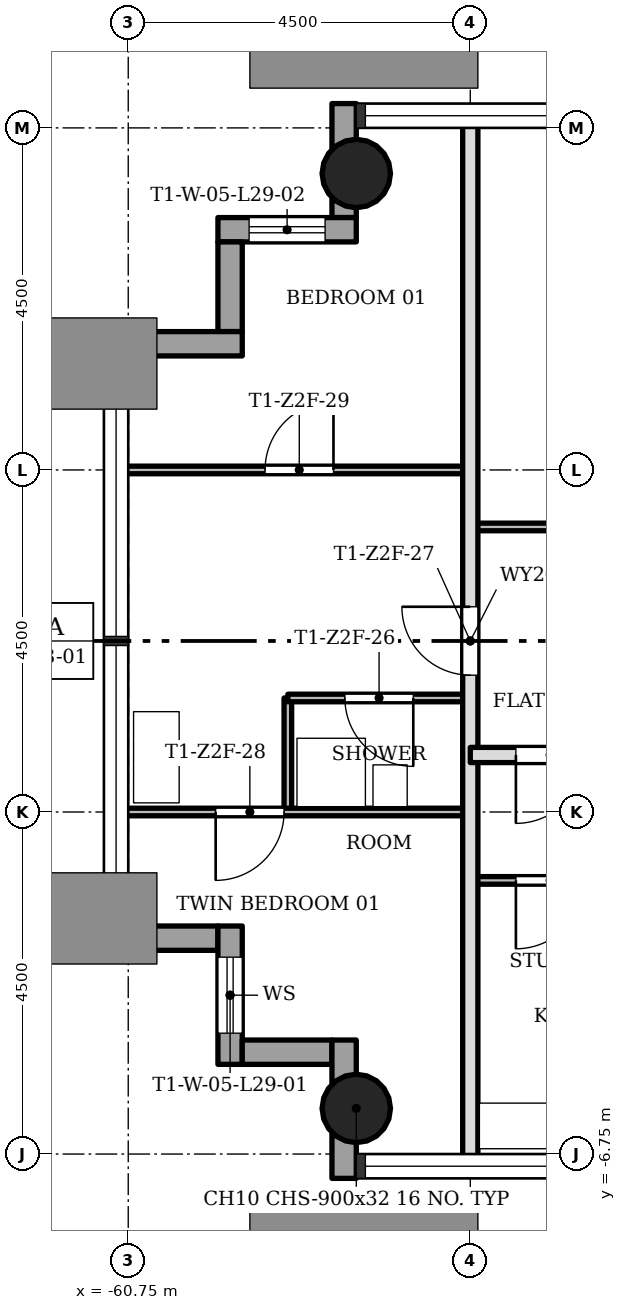
"""IFC4 building model, lengths in metres.
Left out: names, types, materials, properties, quantities, classifications, styles, units other than length and angle.
Written with IfcOpenShell. Run it as: python <this file> out.ifc"""

import sys

from ifc_helpers import new_model, si_unit, direction, frame, frame_2d, origin, origin_2d, place, context, subcontext, project, spatial, rectangle, hollow_circle, extrude, element, fill, save


model = new_model("IFC4")
c1 = context("Model", 3, precision=1e-05, world=origin(), true_north=direction((0.0, 1.0)))
c2 = subcontext(c1, "Body", "Model", "MODEL_VIEW")
j1 = project(units=[si_unit("LENGTHUNIT", "METRE"), si_unit("PLANEANGLEUNIT", "RADIAN")], contexts=[c1])
p1 = place(None, origin())
s1 = spatial("IfcSite", under=j1, at=p1, CompositionType="ELEMENT")
p2 = place(p1, origin())
s2 = spatial("IfcBuilding", under=s1, at=p2, CompositionType="ELEMENT")
p3 = place(p2, frame((0.0, 0.0, 107.2)))
s3 = spatial("IfcBuildingStorey", under=s2, at=p3, CompositionType="ELEMENT", Elevation=107.2)
for number, where, z_axis, x_axis in (
    (1, (-57.75, -6.15, 0.0), (0.0, 0.0, 1.0), (1.0, 0.0, 0.0)),
    (2, (-57.75, 6.15, 0.0), (0.0, 0.0, 1.0), (1.0, 0.0, 0.0)),
):
    element("IfcColumn", number, at=place(p3, frame(where, z_axis=z_axis, x_axis=x_axis)), inside=s3, PredefinedType="COLUMN", context=c2, shape_type="SweptSolid", body=[
        extrude(hollow_circle(Radius=0.45, WallThickness=0.032, at=origin_2d()), origin(), (0.0, 0.0, 1.0), 3.4),
    ])
p4 = place(p3, frame((-61.07, -3.91, -0.3), z_axis=(0.0, 0.0, 1.0), x_axis=(1.0, 0.0, 0.0)))
e3 = element("IfcWall", 3, at=p4, inside=s3, PredefinedType="STANDARD", context=c2, shape_type="SweptSolid", body=[
    extrude(rectangle(XDim=1.5, YDim=0.32, at=frame_2d((0.75, 0.0))), origin(), (0.0, 0.0, 1.0), 3.4),
])
p5 = place(p3, frame((-59.41, -3.75, -0.3), z_axis=(0.0, 0.0, 1.0), x_axis=(0.0, -1.0, 0.0)))
e4 = element("IfcWall", 4, at=p5, inside=s3, PredefinedType="STANDARD", context=c2, shape_type="SweptSolid", body=[
    extrude(rectangle(XDim=1.82, YDim=0.32, at=frame_2d((0.91, 0.0))), origin(), (0.0, 0.0, 1.0), 3.4),
])
p6 = place(p5, frame((0.41, 0.0, 1.2)))
e5 = element("IfcOpeningElement", 5, at=p6, cuts=e4, PredefinedType="OPENING", context=c2, shape_type="SweptSolid", body=[
    extrude(rectangle(XDim=1.0, YDim=1.5, at=frame_2d((0.5, 0.75))), frame((0.0, 0.17, 0.0), z_axis=(0.0, -1.0, 0.0), x_axis=(1.0, 0.0, 0.0)), (0.0, 0.0, 1.0), 0.34),
])
p7 = place(p3, frame((-59.25, -5.41, -0.3), z_axis=(0.0, 0.0, 1.0), x_axis=(1.0, 0.0, 0.0)))
e6 = element("IfcWall", 6, at=p7, inside=s3, PredefinedType="STANDARD", context=c2, shape_type="SweptSolid", body=[
    extrude(rectangle(XDim=1.18, YDim=0.32, at=frame_2d((0.59, 0.0))), origin(), (0.0, 0.0, 1.0), 3.4),
])
p8 = place(p3, frame((-57.91, -5.25, -0.3), z_axis=(0.0, 0.0, 1.0), x_axis=(0.0, -1.0, 0.0)))
e7 = element("IfcWall", 7, at=p8, inside=s3, PredefinedType="STANDARD", context=c2, shape_type="SweptSolid", body=[
    extrude(rectangle(XDim=1.82, YDim=0.32, at=frame_2d((0.91, 0.0))), origin(), (0.0, 0.0, 1.0), 3.4),
])
p9 = place(p3, frame((-57.91, 7.07, -0.3), z_axis=(0.0, 0.0, 1.0), x_axis=(0.0, -1.0, 0.0)))
e8 = element("IfcWall", 8, at=p9, inside=s3, PredefinedType="STANDARD", context=c2, shape_type="SweptSolid", body=[
    extrude(rectangle(XDim=1.5, YDim=0.32, at=frame_2d((0.75, 0.0))), origin(), (0.0, 0.0, 1.0), 3.4),
])
p10 = place(p3, frame((-57.75, 5.41, -0.3), z_axis=(0.0, 0.0, 1.0), x_axis=(-1.0, 0.0, 0.0)))
e9 = element("IfcWall", 9, at=p10, inside=s3, PredefinedType="STANDARD", context=c2, shape_type="SweptSolid", body=[
    extrude(rectangle(XDim=1.82, YDim=0.32, at=frame_2d((0.91, 0.0))), origin(), (0.0, 0.0, 1.0), 3.4),
])
p11 = place(p10, frame((0.41, 0.0, 1.2)))
e10 = element("IfcOpeningElement", 10, at=p11, cuts=e9, PredefinedType="OPENING", context=c2, shape_type="SweptSolid", body=[
    extrude(rectangle(XDim=1.0, YDim=1.5, at=frame_2d((0.5, 0.75))), frame((0.0, 0.17, 0.0), z_axis=(0.0, -1.0, 0.0), x_axis=(1.0, 0.0, 0.0)), (0.0, 0.0, 1.0), 0.34),
])
p12 = place(p3, frame((-59.41, 5.25, -0.3), z_axis=(0.0, 0.0, 1.0), x_axis=(0.0, -1.0, 0.0)))
e11 = element("IfcWall", 11, at=p12, inside=s3, PredefinedType="STANDARD", context=c2, shape_type="SweptSolid", body=[
    extrude(rectangle(XDim=1.18, YDim=0.32, at=frame_2d((0.59, 0.0))), origin(), (0.0, 0.0, 1.0), 3.4),
])
p13 = place(p3, frame((-59.25, 3.91, -0.3), z_axis=(0.0, 0.0, 1.0), x_axis=(-1.0, 0.0, 0.0)))
e12 = element("IfcWall", 12, at=p13, inside=s3, PredefinedType="STANDARD", context=c2, shape_type="SweptSolid", body=[
    extrude(rectangle(XDim=1.82, YDim=0.32, at=frame_2d((0.91, 0.0))), origin(), (0.0, 0.0, 1.0), 3.4),
])
p14 = place(p3, frame((-58.65, -2.25, 0.0), z_axis=(0.0, 0.0, 1.0), x_axis=(0.0, 1.0, 0.0)))
e13 = element("IfcWall", 13, at=p14, inside=s3, PredefinedType="PARTITIONING", context=c2, shape_type="SweptSolid", body=[
    extrude(rectangle(XDim=1.5, YDim=0.1, at=frame_2d((0.75, 0.0))), origin(), (0.0, 0.0, 1.0), 3.0),
])
p15 = place(p3, frame((-56.25, -6.85, 0.0), z_axis=(0.0, 0.0, 1.0), x_axis=(0.0, 1.0, 0.0)))
e14 = element("IfcWall", 14, at=p15, inside=s3, PredefinedType="SOLIDWALL", context=c2, shape_type="SweptSolid", body=[
    extrude(rectangle(XDim=13.7, YDim=0.2, at=frame_2d((6.85, 0.0))), origin(), (0.0, 0.0, 1.0), 3.0),
])
p16 = place(p15, frame((6.4, 0.0, 0.0)))
e15 = element("IfcOpeningElement", 15, at=p16, cuts=e14, PredefinedType="OPENING", context=c2, shape_type="SweptSolid", body=[
    extrude(rectangle(XDim=0.9, YDim=2.1, at=frame_2d((0.45, 1.05))), frame((0.0, 0.11, 0.0), z_axis=(0.0, -1.0, 0.0), x_axis=(1.0, 0.0, 0.0)), (0.0, 0.0, 1.0), 0.22),
])
p17 = place(p3, frame((-56.25, -3.15, 0.0), z_axis=(0.0, 0.0, 1.0), x_axis=(1.0, 0.0, 0.0)))
e16 = element("IfcWall", 16, at=p17, inside=s3, PredefinedType="PARTITIONING", context=c2, shape_type="SweptSolid", body=[
    extrude(rectangle(XDim=4.5, YDim=0.1, at=frame_2d((2.25, 0.0))), origin(), (0.0, 0.0, 1.0), 3.0),
])
p18 = place(p17, frame((0.6, 0.0, 0.0)))
e17 = element("IfcOpeningElement", 17, at=p18, cuts=e16, PredefinedType="OPENING", context=c2, shape_type="SweptSolid", body=[
    extrude(rectangle(XDim=0.9, YDim=2.1, at=frame_2d((0.45, 1.05))), frame((0.0, 0.06, 0.0), z_axis=(0.0, -1.0, 0.0), x_axis=(1.0, 0.0, 0.0)), (0.0, 0.0, 1.0), 0.12),
])
p19 = place(p3, frame((-60.85, -2.25, 0.0), z_axis=(0.0, 0.0, 1.0), x_axis=(1.0, 0.0, 0.0)))
e18 = element("IfcWall", 18, at=p19, inside=s3, PredefinedType="PARTITIONING", context=c2, shape_type="SweptSolid", body=[
    extrude(rectangle(XDim=4.6, YDim=0.1, at=frame_2d((2.3, 0.0))), origin(), (0.0, 0.0, 1.0), 3.0),
])
p20 = place(p19, frame((1.25, 0.0, 0.0)))
e19 = element("IfcOpeningElement", 19, at=p20, cuts=e18, PredefinedType="OPENING", context=c2, shape_type="SweptSolid", body=[
    extrude(rectangle(XDim=0.9, YDim=2.1, at=frame_2d((0.45, 1.05))), frame((0.0, 0.06, 0.0), z_axis=(0.0, -1.0, 0.0), x_axis=(1.0, 0.0, 0.0)), (0.0, 0.0, 1.0), 0.12),
])
p21 = place(p3, frame((-56.25, -1.5, 0.0), z_axis=(0.0, 0.0, 1.0), x_axis=(1.0, 0.0, 0.0)))
e20 = element("IfcWall", 20, at=p21, inside=s3, PredefinedType="SOLIDWALL", context=c2, shape_type="SweptSolid", body=[
    extrude(rectangle(XDim=4.5, YDim=0.2, at=frame_2d((2.25, 0.0))), origin(), (0.0, 0.0, 1.0), 3.0),
])
p22 = place(p21, frame((0.6, 0.0, 0.0)))
e21 = element("IfcOpeningElement", 21, at=p22, cuts=e20, PredefinedType="OPENING", context=c2, shape_type="SweptSolid", body=[
    extrude(rectangle(XDim=0.9, YDim=2.1, at=frame_2d((0.45, 1.05))), frame((0.0, 0.11, 0.0), z_axis=(0.0, -1.0, 0.0), x_axis=(1.0, 0.0, 0.0)), (0.0, 0.0, 1.0), 0.22),
])
p23 = place(p3, frame((-58.65, -0.75, 0.0), z_axis=(0.0, 0.0, 1.0), x_axis=(1.0, 0.0, 0.0)))
e22 = element("IfcWall", 22, at=p23, inside=s3, PredefinedType="PARTITIONING", context=c2, shape_type="SweptSolid", body=[
    extrude(rectangle(XDim=2.4, YDim=0.1, at=frame_2d((1.2, 0.0))), origin(), (0.0, 0.0, 1.0), 3.0),
])
p24 = place(p23, frame((0.75, 0.0, 0.0)))
e23 = element("IfcOpeningElement", 23, at=p24, cuts=e22, PredefinedType="OPENING", context=c2, shape_type="SweptSolid", body=[
    extrude(rectangle(XDim=0.9, YDim=2.1, at=frame_2d((0.45, 1.05))), frame((0.0, 0.06, 0.0), z_axis=(0.0, -1.0, 0.0), x_axis=(1.0, 0.0, 0.0)), (0.0, 0.0, 1.0), 0.12),
])
p25 = place(p3, frame((-56.25, 1.5, 0.0), z_axis=(0.0, 0.0, 1.0), x_axis=(1.0, 0.0, 0.0)))
e24 = element("IfcWall", 24, at=p25, inside=s3, PredefinedType="PARTITIONING", context=c2, shape_type="SweptSolid", body=[
    extrude(rectangle(XDim=4.5, YDim=0.1, at=frame_2d((2.25, 0.0))), origin(), (0.0, 0.0, 1.0), 3.0),
])
p26 = place(p25, frame((1.8, 0.0, 0.0)))
e25 = element("IfcOpeningElement", 25, at=p26, cuts=e24, PredefinedType="OPENING", context=c2, shape_type="SweptSolid", body=[
    extrude(rectangle(XDim=0.9, YDim=2.1, at=frame_2d((0.45, 1.05))), frame((0.0, 0.06, 0.0), z_axis=(0.0, -1.0, 0.0), x_axis=(1.0, 0.0, 0.0)), (0.0, 0.0, 1.0), 0.12),
])
p27 = place(p3, frame((-60.85, 2.25, 0.0), z_axis=(0.0, 0.0, 1.0), x_axis=(1.0, 0.0, 0.0)))
e26 = element("IfcWall", 26, at=p27, inside=s3, PredefinedType="PARTITIONING", context=c2, shape_type="SweptSolid", body=[
    extrude(rectangle(XDim=4.6, YDim=0.1, at=frame_2d((2.3, 0.0))), origin(), (0.0, 0.0, 1.0), 3.0),
])
p28 = place(p27, frame((1.9, 0.0, 0.0)))
e27 = element("IfcOpeningElement", 27, at=p28, cuts=e26, PredefinedType="OPENING", context=c2, shape_type="SweptSolid", body=[
    extrude(rectangle(XDim=0.9, YDim=2.1, at=frame_2d((0.45, 1.05))), frame((0.0, 0.06, 0.0), z_axis=(0.0, -1.0, 0.0), x_axis=(1.0, 0.0, 0.0)), (0.0, 0.0, 1.0), 0.12),
])
p29 = place(p22, origin())
e28 = element("IfcDoor", 28, at=p29, inside=s3, OperationType="SINGLE_SWING_LEFT", PredefinedType="DOOR", context=c2, shape_type="SweptSolid", body=[
    extrude(rectangle(XDim=0.9, YDim=2.1, at=frame_2d((0.45, 1.05))), frame((0.0, 0.025, 0.0), z_axis=(0.0, -1.0, 0.0), x_axis=(1.0, 0.0, 0.0)), (0.0, 0.0, 1.0), 0.05),
])
fill(e21, e28)
p30 = place(p18, origin())
e29 = element("IfcDoor", 29, at=p30, inside=s3, OperationType="SINGLE_SWING_LEFT", PredefinedType="DOOR", context=c2, shape_type="SweptSolid", body=[
    extrude(rectangle(XDim=0.9, YDim=2.1, at=frame_2d((0.45, 1.05))), frame((0.0, 0.025, 0.0), z_axis=(0.0, -1.0, 0.0), x_axis=(1.0, 0.0, 0.0)), (0.0, 0.0, 1.0), 0.05),
])
fill(e17, e29)
p31 = place(p24, origin())
e30 = element("IfcDoor", 30, at=p31, inside=s3, OperationType="SINGLE_SWING_RIGHT", PredefinedType="DOOR", context=c2, shape_type="SweptSolid", body=[
    extrude(rectangle(XDim=0.9, YDim=2.1, at=frame_2d((0.45, 1.05))), frame((0.0, 0.025, 0.0), z_axis=(0.0, -1.0, 0.0), x_axis=(1.0, 0.0, 0.0)), (0.0, 0.0, 1.0), 0.05),
])
fill(e23, e30)
p32 = place(p16, origin())
e31 = element("IfcDoor", 31, at=p32, inside=s3, OperationType="SINGLE_SWING_LEFT", PredefinedType="DOOR", context=c2, shape_type="SweptSolid", body=[
    extrude(rectangle(XDim=0.9, YDim=2.1, at=frame_2d((0.45, 1.05))), frame((0.0, 0.025, 0.0), z_axis=(0.0, -1.0, 0.0), x_axis=(1.0, 0.0, 0.0)), (0.0, 0.0, 1.0), 0.05),
])
fill(e15, e31)
p33 = place(p20, origin())
e32 = element("IfcDoor", 32, at=p33, inside=s3, OperationType="SINGLE_SWING_LEFT", PredefinedType="DOOR", context=c2, shape_type="SweptSolid", body=[
    extrude(rectangle(XDim=0.9, YDim=2.1, at=frame_2d((0.45, 1.05))), frame((0.0, 0.025, 0.0), z_axis=(0.0, -1.0, 0.0), x_axis=(1.0, 0.0, 0.0)), (0.0, 0.0, 1.0), 0.05),
])
fill(e19, e32)
p34 = place(p28, origin())
e33 = element("IfcDoor", 33, at=p34, inside=s3, OperationType="SINGLE_SWING_LEFT", PredefinedType="DOOR", context=c2, shape_type="SweptSolid", body=[
    extrude(rectangle(XDim=0.9, YDim=2.1, at=frame_2d((0.45, 1.05))), frame((0.0, 0.025, 0.0), z_axis=(0.0, -1.0, 0.0), x_axis=(1.0, 0.0, 0.0)), (0.0, 0.0, 1.0), 0.05),
])
fill(e27, e33)
p35 = place(p6, origin())
e34 = element("IfcWindow", 34, at=p35, inside=s3, PartitioningType="SINGLE_PANEL", PredefinedType="WINDOW", context=c2, shape_type="SweptSolid", body=[
    extrude(rectangle(XDim=1.0, YDim=1.5, at=frame_2d((0.5, 0.75))), frame((0.0, 0.03, 0.0), z_axis=(0.0, -1.0, 0.0), x_axis=(1.0, 0.0, 0.0)), (0.0, 0.0, 1.0), 0.06),
])
fill(e5, e34)
p36 = place(p11, origin())
e35 = element("IfcWindow", 35, at=p36, inside=s3, PartitioningType="SINGLE_PANEL", PredefinedType="WINDOW", context=c2, shape_type="SweptSolid", body=[
    extrude(rectangle(XDim=1.0, YDim=1.5, at=frame_2d((0.5, 0.75))), frame((0.0, 0.03, 0.0), z_axis=(0.0, -1.0, 0.0), x_axis=(1.0, 0.0, 0.0)), (0.0, 0.0, 1.0), 0.06),
])
fill(e10, e35)
save(model, sys.argv[1])
